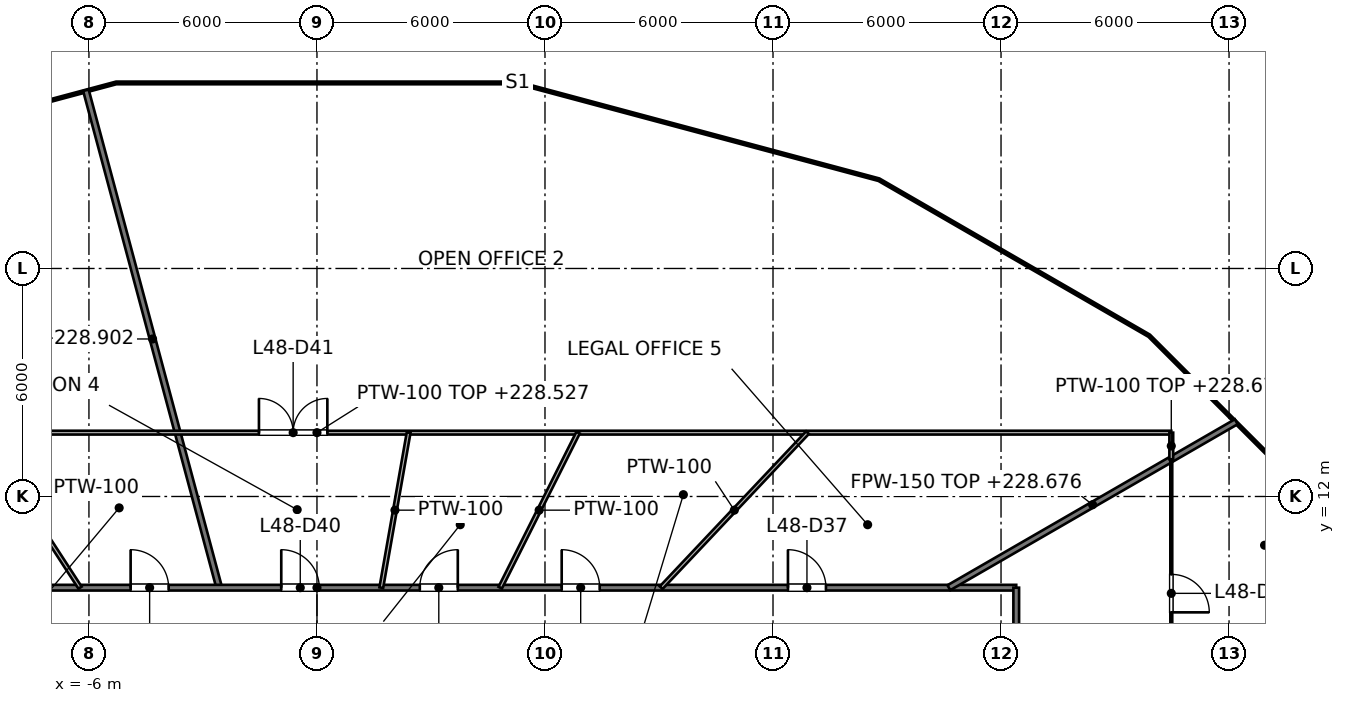
"""IFC4 building model, lengths in metres.
Left out: names, types, materials, properties, quantities, classifications, styles, units other than length and angle.
Written with IfcOpenShell. Run it as: python <this file> out.ifc"""

import sys

from ifc_helpers import new_model, si_unit, direction, frame, frame_2d, origin, place, context, subcontext, project, spatial, rectangle, extrude, element, fill, save


model = new_model("IFC4")
c1 = context("Model", 3, precision=1e-05, world=origin(), true_north=direction((0.0, 1.0)))
c2 = subcontext(c1, "Body", "Model", "MODEL_VIEW")
j1 = project(units=[si_unit("LENGTHUNIT", "METRE"), si_unit("PLANEANGLEUNIT", "RADIAN")], contexts=[c1])
p1 = place(None, origin())
s1 = spatial("IfcSite", under=j1, at=p1, CompositionType="ELEMENT")
p2 = place(p1, origin())
s2 = spatial("IfcBuilding", under=s1, at=p2, CompositionType="ELEMENT")
p3 = place(p2, frame((0.0, 0.0, 225.6)))
s3 = spatial("IfcBuildingStorey", under=s2, at=p3, CompositionType="ELEMENT", Elevation=225.6)
p4 = place(p3, frame((-6.08, 22.69, 0.0), z_axis=(0.0, 0.0, 1.0), x_axis=(0.258842041415, -0.965919664152, 0.0)))
e1 = element("IfcWall", 1, at=p4, inside=s3, PredefinedType="PARTITIONING", context=c2, shape_type="SweptSolid", body=[
    extrude(rectangle(XDim=13.552, YDim=0.15, at=frame_2d((6.776, 0.0))), origin(), (0.0, 0.0, 1.0), 3.302),
])
p5 = place(p3, frame((-18.4, 9.6, 0.0), z_axis=(0.0, 0.0, 1.0), x_axis=(1.0, 0.0, 0.0)))
e2 = element("IfcWall", 2, at=p5, inside=s3, PredefinedType="PARTITIONING", context=c2, shape_type="SweptSolid", body=[
    extrude(rectangle(XDim=36.8, YDim=0.15, at=frame_2d((18.4, 0.0))), origin(), (0.0, 0.0, 1.0), 2.927),
])
p6 = place(p5, frame((30.793, 0.0, 0.0)))
e3 = element("IfcOpeningElement", 3, at=p6, cuts=e2, PredefinedType="OPENING", context=c2, shape_type="SweptSolid", body=[
    extrude(rectangle(XDim=1.0, YDim=2.1, at=frame_2d((0.5, 1.05))), frame((0.0, 0.075, 0.0), z_axis=(0.0, -1.0, 0.0), x_axis=(1.0, 0.0, 0.0)), (0.0, 0.0, 1.0), 0.15),
])
p7 = place(p5, frame((24.84, 0.0, 0.0)))
e4 = element("IfcOpeningElement", 4, at=p7, cuts=e2, PredefinedType="OPENING", context=c2, shape_type="SweptSolid", body=[
    extrude(rectangle(XDim=1.0, YDim=2.1, at=frame_2d((0.5, 1.05))), frame((0.0, 0.075, 0.0), z_axis=(0.0, -1.0, 0.0), x_axis=(1.0, 0.0, 0.0)), (0.0, 0.0, 1.0), 0.15),
])
p8 = place(p5, frame((21.106, 0.0, 0.0)))
e5 = element("IfcOpeningElement", 5, at=p8, cuts=e2, PredefinedType="OPENING", context=c2, shape_type="SweptSolid", body=[
    extrude(rectangle(XDim=1.0, YDim=2.1, at=frame_2d((0.5, 1.05))), frame((0.0, 0.075, 0.0), z_axis=(0.0, -1.0, 0.0), x_axis=(1.0, 0.0, 0.0)), (0.0, 0.0, 1.0), 0.15),
])
p9 = place(p5, frame((17.46, 0.0, 0.0)))
e6 = element("IfcOpeningElement", 6, at=p9, cuts=e2, PredefinedType="OPENING", context=c2, shape_type="SweptSolid", body=[
    extrude(rectangle(XDim=1.0, YDim=2.1, at=frame_2d((0.5, 1.05))), frame((0.0, 0.075, 0.0), z_axis=(0.0, -1.0, 0.0), x_axis=(1.0, 0.0, 0.0)), (0.0, 0.0, 1.0), 0.15),
])
p10 = place(p5, frame((13.497, 0.0, 0.0)))
e7 = element("IfcOpeningElement", 7, at=p10, cuts=e2, PredefinedType="OPENING", context=c2, shape_type="SweptSolid", body=[
    extrude(rectangle(XDim=1.0, YDim=2.1, at=frame_2d((0.5, 1.05))), frame((0.0, 0.075, 0.0), z_axis=(0.0, -1.0, 0.0), x_axis=(1.0, 0.0, 0.0)), (0.0, 0.0, 1.0), 0.15),
])
p11 = place(p5, frame((6.418, 0.0, 0.0)))
e8 = element("IfcOpeningElement", 8, at=p11, cuts=e2, PredefinedType="OPENING", context=c2, shape_type="SweptSolid", body=[
    extrude(rectangle(XDim=1.0, YDim=2.1, at=frame_2d((0.5, 1.05))), frame((0.0, 0.075, 0.0), z_axis=(0.0, -1.0, 0.0), x_axis=(1.0, 0.0, 0.0)), (0.0, 0.0, 1.0), 0.15),
])
p12 = place(p3, frame((16.628, 9.6, 0.0), z_axis=(0.0, 0.0, 1.0), x_axis=(0.865980240946, 0.500078216174, 0.0)))
e9 = element("IfcWall", 9, at=p12, inside=s3, PredefinedType="PARTITIONING", context=c2, shape_type="SweptSolid", body=[
    extrude(rectangle(XDim=8.732, YDim=0.15, at=frame_2d((4.366, 0.0))), origin(), (0.0, 0.0, 1.0), 3.076),
])
p13 = place(p3, frame((18.4, -9.6, 0.0), z_axis=(0.0, 0.0, 1.0), x_axis=(0.0, 1.0, 0.0)))
e10 = element("IfcWall", 10, at=p13, inside=s3, PredefinedType="PARTITIONING", context=c2, shape_type="SweptSolid", body=[
    extrude(rectangle(XDim=19.2, YDim=0.15, at=frame_2d((9.6, 0.0))), origin(), (0.0, 0.0, 1.0), 2.918),
])
p14 = place(p13, frame((1.835, 0.0, 0.0)))
e11 = element("IfcOpeningElement", 11, at=p14, cuts=e10, PredefinedType="OPENING", context=c2, shape_type="SweptSolid", body=[
    extrude(rectangle(XDim=1.0, YDim=2.1, at=frame_2d((0.5, 1.05))), frame((0.0, 0.075, 0.0), z_axis=(0.0, -1.0, 0.0), x_axis=(1.0, 0.0, 0.0)), (0.0, 0.0, 1.0), 0.15),
])
p15 = place(p13, frame((6.584, 0.0, 0.0)))
e12 = element("IfcOpeningElement", 12, at=p15, cuts=e10, PredefinedType="OPENING", context=c2, shape_type="SweptSolid", body=[
    extrude(rectangle(XDim=1.0, YDim=2.1, at=frame_2d((0.5, 1.05))), frame((0.0, 0.075, 0.0), z_axis=(0.0, -1.0, 0.0), x_axis=(1.0, 0.0, 0.0)), (0.0, 0.0, 1.0), 0.15),
])
p16 = place(p13, frame((11.514, 0.0, 0.0)))
e13 = element("IfcOpeningElement", 13, at=p16, cuts=e10, PredefinedType="OPENING", context=c2, shape_type="SweptSolid", body=[
    extrude(rectangle(XDim=1.0, YDim=2.1, at=frame_2d((0.5, 1.05))), frame((0.0, 0.075, 0.0), z_axis=(0.0, -1.0, 0.0), x_axis=(1.0, 0.0, 0.0)), (0.0, 0.0, 1.0), 0.15),
])
p17 = place(p13, frame((16.365, 0.0, 0.0)))
e14 = element("IfcOpeningElement", 14, at=p17, cuts=e10, PredefinedType="OPENING", context=c2, shape_type="SweptSolid", body=[
    extrude(rectangle(XDim=1.0, YDim=2.1, at=frame_2d((0.5, 1.05))), frame((0.0, 0.075, 0.0), z_axis=(0.0, -1.0, 0.0), x_axis=(1.0, 0.0, 0.0)), (0.0, 0.0, 1.0), 0.15),
])
p18 = place(p3, frame((22.48, -6.023, 0.0), z_axis=(0.0, 0.0, 1.0), x_axis=(0.0, 1.0, 0.0)))
e15 = element("IfcWall", 15, at=p18, inside=s3, PredefinedType="PARTITIONING", context=c2, shape_type="SweptSolid", body=[
    extrude(rectangle(XDim=19.002, YDim=0.05, at=frame_2d((9.501, 0.0))), origin(), (0.0, 0.0, 1.0), 2.918),
])
p19 = place(p18, frame((2.511, 0.0, 0.0)))
e16 = element("IfcOpeningElement", 16, at=p19, cuts=e15, PredefinedType="OPENING", context=c2, shape_type="SweptSolid", body=[
    extrude(rectangle(XDim=1.0, YDim=2.1, at=frame_2d((0.5, 1.05))), frame((0.0, 0.025, 0.0), z_axis=(0.0, -1.0, 0.0), x_axis=(1.0, 0.0, 0.0)), (0.0, 0.0, 1.0), 0.05),
])
p20 = place(p18, frame((8.534, 0.0, 0.0)))
e17 = element("IfcOpeningElement", 17, at=p20, cuts=e15, PredefinedType="OPENING", context=c2, shape_type="SweptSolid", body=[
    extrude(rectangle(XDim=1.0, YDim=2.1, at=frame_2d((0.5, 1.05))), frame((0.0, 0.025, 0.0), z_axis=(0.0, -1.0, 0.0), x_axis=(1.0, 0.0, 0.0)), (0.0, 0.0, 1.0), 0.05),
])
p21 = place(p18, frame((14.974, 0.0, 0.0)))
e18 = element("IfcOpeningElement", 18, at=p21, cuts=e15, PredefinedType="OPENING", context=c2, shape_type="SweptSolid", body=[
    extrude(rectangle(XDim=1.0, YDim=2.1, at=frame_2d((0.5, 1.05))), frame((0.0, 0.025, 0.0), z_axis=(0.0, -1.0, 0.0), x_axis=(1.0, 0.0, 0.0)), (0.0, 0.0, 1.0), 0.05),
])
p22 = place(p3, frame((-8.884, 13.68, 0.0), z_axis=(0.0, 0.0, 1.0), x_axis=(0.544736088182, -0.838607532898, 0.0)))
e19 = element("IfcWall", 19, at=p22, inside=s3, PredefinedType="PARTITIONING", context=c2, shape_type="SweptSolid", body=[
    extrude(rectangle(XDim=4.865, YDim=0.1, at=frame_2d((2.433, 0.0))), origin(), (0.0, 0.0, 1.0), 3.85),
])
p23 = place(p3, frame((-22.48, 13.68, 0.0), z_axis=(0.0, 0.0, 1.0), x_axis=(1.0, 0.0, 0.0)))
e20 = element("IfcWall", 20, at=p23, inside=s3, PredefinedType="PARTITIONING", context=c2, shape_type="SweptSolid", body=[
    extrude(rectangle(XDim=44.96, YDim=0.1, at=frame_2d((22.48, 0.0))), origin(), (0.0, 0.0, 1.0), 2.927),
])
p24 = place(p23, frame((20.954, 0.0, 0.0)))
e21 = element("IfcOpeningElement", 21, at=p24, cuts=e20, PredefinedType="OPENING", context=c2, shape_type="SweptSolid", body=[
    extrude(rectangle(XDim=1.8, YDim=2.1, at=frame_2d((0.9, 1.05))), frame((0.0, 0.05, 0.0), z_axis=(0.0, -1.0, 0.0), x_axis=(1.0, 0.0, 0.0)), (0.0, 0.0, 1.0), 0.1),
])
p25 = place(p23, frame((6.348, 0.0, 0.0)))
e22 = element("IfcOpeningElement", 22, at=p25, cuts=e20, PredefinedType="OPENING", context=c2, shape_type="SweptSolid", body=[
    extrude(rectangle(XDim=0.9, YDim=2.1, at=frame_2d((0.45, 1.05))), frame((0.0, 0.05, 0.0), z_axis=(0.0, -1.0, 0.0), x_axis=(1.0, 0.0, 0.0)), (0.0, 0.0, 1.0), 0.1),
])
p26 = place(p3, frame((9.057, 9.6, 0.0), z_axis=(0.0, 0.0, 1.0), x_axis=(0.686333382584, 0.727287073961, 0.0)))
e23 = element("IfcWall", 23, at=p26, inside=s3, PredefinedType="PARTITIONING", context=c2, shape_type="SweptSolid", body=[
    extrude(rectangle(XDim=5.61, YDim=0.1, at=frame_2d((2.805, 0.0))), origin(), (0.0, 0.0, 1.0), 3.85),
])
p27 = place(p3, frame((4.822, 9.6, 0.0), z_axis=(0.0, 0.0, 1.0), x_axis=(0.448817131352, 0.89362362469, 0.0)))
e24 = element("IfcWall", 24, at=p27, inside=s3, PredefinedType="PARTITIONING", context=c2, shape_type="SweptSolid", body=[
    extrude(rectangle(XDim=4.565, YDim=0.1, at=frame_2d((2.283, 0.0))), origin(), (0.0, 0.0, 1.0), 3.85),
])
p28 = place(p3, frame((1.693, 9.6, 0.0), z_axis=(0.0, 0.0, 1.0), x_axis=(0.173556717923, 0.984823875454, 0.0)))
e25 = element("IfcWall", 25, at=p28, inside=s3, PredefinedType="PARTITIONING", context=c2, shape_type="SweptSolid", body=[
    extrude(rectangle(XDim=4.143, YDim=0.1, at=frame_2d((2.071, 0.0))), origin(), (0.0, 0.0, 1.0), 3.85),
])
p29 = place(p3, frame((22.48, 12.979, 0.0), z_axis=(0.0, 0.0, 1.0), x_axis=(0.0, 1.0, 0.0)))
e26 = element("IfcWall", 26, at=p29, inside=s3, PredefinedType="PARTITIONING", context=c2, shape_type="SweptSolid", body=[
    extrude(rectangle(XDim=0.701, YDim=0.1, at=frame_2d((0.351, 0.0))), origin(), (0.0, 0.0, 1.0), 3.076),
])
p30 = place(p21, origin())
e27 = element("IfcDoor", 27, at=p30, inside=s3, OperationType="SINGLE_SWING_LEFT", PredefinedType="DOOR", context=c2, shape_type="SweptSolid", body=[
    extrude(rectangle(XDim=1.0, YDim=2.1, at=frame_2d((0.5, 1.05))), frame((0.0, 0.025, 0.0), z_axis=(0.0, -1.0, 0.0), x_axis=(1.0, 0.0, 0.0)), (0.0, 0.0, 1.0), 0.05),
])
fill(e18, e27)
p31 = place(p6, origin())
e28 = element("IfcDoor", 28, at=p31, inside=s3, OperationType="SINGLE_SWING_LEFT", PredefinedType="DOOR", context=c2, shape_type="SweptSolid", body=[
    extrude(rectangle(XDim=1.0, YDim=2.1, at=frame_2d((0.5, 1.05))), frame((0.0, 0.025, 0.0), z_axis=(0.0, -1.0, 0.0), x_axis=(1.0, 0.0, 0.0)), (0.0, 0.0, 1.0), 0.05),
])
fill(e3, e28)
p32 = place(p7, origin())
e29 = element("IfcDoor", 29, at=p32, inside=s3, OperationType="SINGLE_SWING_LEFT", PredefinedType="DOOR", context=c2, shape_type="SweptSolid", body=[
    extrude(rectangle(XDim=1.0, YDim=2.1, at=frame_2d((0.5, 1.05))), frame((0.0, 0.025, 0.0), z_axis=(0.0, -1.0, 0.0), x_axis=(1.0, 0.0, 0.0)), (0.0, 0.0, 1.0), 0.05),
])
fill(e4, e29)
p33 = place(p8, origin())
e30 = element("IfcDoor", 30, at=p33, inside=s3, OperationType="SINGLE_SWING_RIGHT", PredefinedType="DOOR", context=c2, shape_type="SweptSolid", body=[
    extrude(rectangle(XDim=1.0, YDim=2.1, at=frame_2d((0.5, 1.05))), frame((0.0, 0.025, 0.0), z_axis=(0.0, -1.0, 0.0), x_axis=(1.0, 0.0, 0.0)), (0.0, 0.0, 1.0), 0.05),
])
fill(e5, e30)
p34 = place(p9, origin())
e31 = element("IfcDoor", 31, at=p34, inside=s3, OperationType="SINGLE_SWING_LEFT", PredefinedType="DOOR", context=c2, shape_type="SweptSolid", body=[
    extrude(rectangle(XDim=1.0, YDim=2.1, at=frame_2d((0.5, 1.05))), frame((0.0, 0.025, 0.0), z_axis=(0.0, -1.0, 0.0), x_axis=(1.0, 0.0, 0.0)), (0.0, 0.0, 1.0), 0.05),
])
fill(e6, e31)
p35 = place(p24, origin())
e32 = element("IfcDoor", 32, at=p35, inside=s3, OperationType="DOUBLE_DOOR_SINGLE_SWING", PredefinedType="DOOR", context=c2, shape_type="SweptSolid", body=[
    extrude(rectangle(XDim=1.8, YDim=2.1, at=frame_2d((0.9, 1.05))), frame((0.0, 0.025, 0.0), z_axis=(0.0, -1.0, 0.0), x_axis=(1.0, 0.0, 0.0)), (0.0, 0.0, 1.0), 0.05),
])
fill(e21, e32)
p36 = place(p10, origin())
e33 = element("IfcDoor", 33, at=p36, inside=s3, OperationType="SINGLE_SWING_LEFT", PredefinedType="DOOR", context=c2, shape_type="SweptSolid", body=[
    extrude(rectangle(XDim=1.0, YDim=2.1, at=frame_2d((0.5, 1.05))), frame((0.0, 0.025, 0.0), z_axis=(0.0, -1.0, 0.0), x_axis=(1.0, 0.0, 0.0)), (0.0, 0.0, 1.0), 0.05),
])
fill(e7, e33)
save(model, sys.argv[1])
